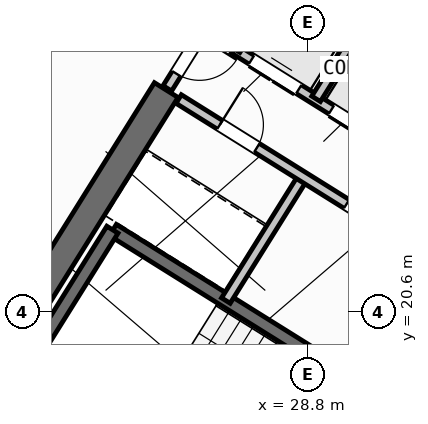
"""IFC4 building model, lengths in metres.
Left out: names, types, materials, properties, quantities, classifications, styles, units other than length and angle.
Written with IfcOpenShell. Run it as: python <this file> out.ifc"""

import sys

from ifc_helpers import new_model, si_unit, direction, frame, frame_2d, origin, place, context, subcontext, project, spatial, rectangle, extrude, source, transform, mapped, element, fill, save


model = new_model("IFC4")
c1 = context("Model", 3, precision=1e-05, world=origin(), true_north=direction((0.0, 1.0)))
c2 = subcontext(c1, "Body", "Model", "MODEL_VIEW")
j1 = project(units=[si_unit("LENGTHUNIT", "METRE"), si_unit("PLANEANGLEUNIT", "RADIAN")], contexts=[c1])
p1 = place(None, origin())
s1 = spatial("IfcSite", under=j1, at=p1, CompositionType="ELEMENT")
p2 = place(p1, origin())
s2 = spatial("IfcBuilding", under=s1, at=p2, CompositionType="ELEMENT")
p3 = place(p2, frame((0.0, 0.0, 136.2)))
s3 = spatial("IfcBuildingStorey", under=s2, at=p3, CompositionType="ELEMENT", Elevation=136.2)
p4 = place(p3, frame((40.573, 24.01, 0.0), z_axis=(0.0, 0.0, 1.0), x_axis=(-0.848047359947, 0.529920442413, 0.0)))
e1 = element("IfcWall", 1, at=p4, inside=s3, PredefinedType="SHEAR", context=c2, shape_type="SweptSolid", body=[
    extrude(rectangle(XDim=13.14, YDim=0.55, at=frame_2d((6.57, 0.0))), origin(), (0.0, 0.0, 1.0), 4.25),
])
p5 = place(p3, frame((26.007, 24.976, 0.0), z_axis=(0.0, 0.0, 1.0), x_axis=(-0.529923795287, -0.848045264823, 0.0)))
e2 = element("IfcWall", 2, at=p5, inside=s3, PredefinedType="SHEAR", context=c2, shape_type="SweptSolid", body=[
    extrude(rectangle(XDim=6.425, YDim=0.55, at=frame_2d((3.212, 0.0))), origin(), (0.0, 0.0, 1.0), 4.25),
])
p6 = place(p3, frame((29.268, 6.429, 0.0), z_axis=(0.0, 0.0, 1.0), x_axis=(-0.848049971435, 0.529916263149, 0.0)))
e3 = element("IfcWall", 3, at=p6, inside=s3, PredefinedType="STANDARD", context=c2, shape_type="SweptSolid", body=[
    extrude(rectangle(XDim=31.588, YDim=0.32, at=frame_2d((15.794, 0.0))), origin(), (0.0, 0.0, 1.0), 4.25),
])
p7 = place(p6, frame((16.374, 0.0, 0.0)))
e4 = element("IfcOpeningElement", 4, at=p7, cuts=e3, PredefinedType="OPENING", context=c2, shape_type="SweptSolid", body=[
    extrude(rectangle(XDim=1.2, YDim=2.15, at=frame_2d((0.6, 1.075))), frame((0.0, 0.17, 0.0), z_axis=(0.0, -1.0, 0.0), x_axis=(1.0, 0.0, 0.0)), (0.0, 0.0, 1.0), 0.34),
])
p8 = place(p6, frame((20.561, 0.0, 0.7)))
e5 = element("IfcOpeningElement", 5, at=p8, cuts=e3, PredefinedType="OPENING", context=c2, shape_type="SweptSolid", body=[
    extrude(rectangle(XDim=2.6, YDim=2.0, at=frame_2d((1.3, 1.0))), frame((0.0, 0.17, 0.0), z_axis=(0.0, -1.0, 0.0), x_axis=(1.0, 0.0, 0.0)), (0.0, 0.0, 1.0), 0.34),
])
p9 = place(p6, frame((27.516, 0.0, 0.75)))
e6 = element("IfcOpeningElement", 6, at=p9, cuts=e3, PredefinedType="OPENING", context=c2, shape_type="SweptSolid", body=[
    extrude(rectangle(XDim=2.0, YDim=1.95, at=frame_2d((1.0, 0.975))), frame((0.0, 0.17, 0.0), z_axis=(0.0, -1.0, 0.0), x_axis=(1.0, 0.0, 0.0)), (0.0, 0.0, 1.0), 0.34),
])
p10 = place(p3, frame((14.138, 41.825, 0.0), z_axis=(0.0, 0.0, 1.0), x_axis=(0.848046498049, -0.529921821731, 0.0)))
e7 = element("IfcWall", 7, at=p10, inside=s3, PredefinedType="STANDARD", context=c2, shape_type="SweptSolid", body=[
    extrude(rectangle(XDim=31.588, YDim=0.32, at=frame_2d((15.794, 0.0))), origin(), (0.0, 0.0, 1.0), 4.25),
])
p11 = place(p10, frame((9.857, 0.0, 0.0)))
e8 = element("IfcOpeningElement", 8, at=p11, cuts=e7, PredefinedType="OPENING", context=c2, shape_type="SweptSolid", body=[
    extrude(rectangle(XDim=1.05, YDim=2.15, at=frame_2d((0.525, 1.075))), frame((0.0, 0.17, 0.0), z_axis=(0.0, -1.0, 0.0), x_axis=(1.0, 0.0, 0.0)), (0.0, 0.0, 1.0), 0.34),
])
p12 = place(p10, frame((0.862, 0.0, 0.85)))
e9 = element("IfcOpeningElement", 9, at=p12, cuts=e7, PredefinedType="OPENING", context=c2, shape_type="SweptSolid", body=[
    extrude(rectangle(XDim=1.6, YDim=1.8, at=frame_2d((0.8, 0.9))), frame((0.0, 0.17, 0.0), z_axis=(0.0, -1.0, 0.0), x_axis=(1.0, 0.0, 0.0)), (0.0, 0.0, 1.0), 0.34),
])
p13 = place(p10, frame((7.648, 0.0, 0.85)))
e10 = element("IfcOpeningElement", 10, at=p13, cuts=e7, PredefinedType="OPENING", context=c2, shape_type="SweptSolid", body=[
    extrude(rectangle(XDim=1.6, YDim=1.8, at=frame_2d((0.8, 0.9))), frame((0.0, 0.17, 0.0), z_axis=(0.0, -1.0, 0.0), x_axis=(1.0, 0.0, 0.0)), (0.0, 0.0, 1.0), 0.34),
])
p14 = place(p10, frame((13.824, 0.0, 0.85)))
e11 = element("IfcOpeningElement", 11, at=p14, cuts=e7, PredefinedType="OPENING", context=c2, shape_type="SweptSolid", body=[
    extrude(rectangle(XDim=1.6, YDim=1.8, at=frame_2d((0.8, 0.9))), frame((0.0, 0.17, 0.0), z_axis=(0.0, -1.0, 0.0), x_axis=(1.0, 0.0, 0.0)), (0.0, 0.0, 1.0), 0.34),
])
p15 = place(p10, frame((21.294, 0.0, 0.7)))
e12 = element("IfcOpeningElement", 12, at=p15, cuts=e7, PredefinedType="OPENING", context=c2, shape_type="SweptSolid", body=[
    extrude(rectangle(XDim=2.6, YDim=2.0, at=frame_2d((1.3, 1.0))), frame((0.0, 0.17, 0.0), z_axis=(0.0, -1.0, 0.0), x_axis=(1.0, 0.0, 0.0)), (0.0, 0.0, 1.0), 0.34),
])
p16 = place(p10, frame((26.894, 0.0, 0.7)))
e13 = element("IfcOpeningElement", 13, at=p16, cuts=e7, PredefinedType="OPENING", context=c2, shape_type="SweptSolid", body=[
    extrude(rectangle(XDim=2.6, YDim=2.0, at=frame_2d((1.3, 1.0))), frame((0.0, 0.17, 0.0), z_axis=(0.0, -1.0, 0.0), x_axis=(1.0, 0.0, 0.0)), (0.0, 0.0, 1.0), 0.34),
])
p17 = place(p3, frame((31.28, 18.261, 0.0), z_axis=(0.0, 0.0, 1.0), x_axis=(-0.848051618787, 0.529913626805, 0.0)))
e14 = element("IfcWall", 14, at=p17, inside=s3, PredefinedType="SHEAR", context=c2, shape_type="SweptSolid", body=[
    extrude(rectangle(XDim=7.46, YDim=0.26, at=frame_2d((3.73, 0.0))), origin(), (0.0, 0.0, 1.0), 4.25),
])
p18 = place(p17, frame((0.36, 0.0, 0.0)))
e15 = element("IfcOpeningElement", 15, at=p18, cuts=e14, PredefinedType="OPENING", context=c2, shape_type="SweptSolid", body=[
    extrude(rectangle(XDim=0.86, YDim=2.05, at=frame_2d((0.43, 1.025))), frame((0.0, 0.14, 0.0), z_axis=(0.0, -1.0, 0.0), x_axis=(1.0, 0.0, 0.0)), (0.0, 0.0, 1.0), 0.28),
])
p19 = place(p3, frame((24.945, 22.22, 0.0), z_axis=(0.0, 0.0, 1.0), x_axis=(-0.529908658664, -0.84805472316, 0.0)))
e16 = element("IfcWall", 16, at=p19, inside=s3, PredefinedType="SHEAR", context=c2, shape_type="SweptSolid", body=[
    extrude(rectangle(XDim=3.16, YDim=0.26, at=frame_2d((1.58, 0.0))), origin(), (0.0, 0.0, 1.0), 4.25),
])
p20 = place(p3, frame((31.822, 24.998, 0.0), z_axis=(0.0, 0.0, 1.0), x_axis=(-0.848036912365, 0.52993716162, 0.0)))
e17 = element("IfcWall", 17, at=p20, inside=s3, PredefinedType="STANDARD", context=c2, shape_type="SweptSolid", body=[
    extrude(rectangle(XDim=4.618, YDim=0.2, at=frame_2d((2.309, 0.0))), origin(), (0.0, 0.0, 1.0), 4.24),
])
p21 = place(p3, frame((32.108, 22.814, 0.0), z_axis=(0.0, 0.0, 1.0), x_axis=(-0.848042229521, 0.529928652696, 0.0)))
e18 = element("IfcWall", 18, at=p21, inside=s3, PredefinedType="STANDARD", context=c2, shape_type="SweptSolid", body=[
    extrude(rectangle(XDim=5.62, YDim=0.2, at=frame_2d((2.81, 0.0))), origin(), (0.0, 0.0, 1.0), 4.24),
])
p22 = place(p21, frame((0.39, 0.0, 0.0)))
e19 = element("IfcOpeningElement", 19, at=p22, cuts=e18, PredefinedType="OPENING", context=c2, shape_type="SweptSolid", body=[
    extrude(rectangle(XDim=1.1, YDim=2.15, at=frame_2d((0.55, 1.075))), frame((0.0, 0.11, 0.0), z_axis=(0.0, -1.0, 0.0), x_axis=(1.0, 0.0, 0.0)), (0.0, 0.0, 1.0), 0.22),
])
p23 = place(p21, frame((2.25, 0.0, 0.0)))
e20 = element("IfcOpeningElement", 20, at=p23, cuts=e18, PredefinedType="OPENING", context=c2, shape_type="SweptSolid", body=[
    extrude(rectangle(XDim=1.1, YDim=2.15, at=frame_2d((0.55, 1.075))), frame((0.0, 0.11, 0.0), z_axis=(0.0, -1.0, 0.0), x_axis=(1.0, 0.0, 0.0)), (0.0, 0.0, 1.0), 0.22),
])
p24 = place(p21, frame((4.11, 0.0, 0.0)))
e21 = element("IfcOpeningElement", 21, at=p24, cuts=e18, PredefinedType="OPENING", context=c2, shape_type="SweptSolid", body=[
    extrude(rectangle(XDim=1.1, YDim=2.15, at=frame_2d((0.55, 1.075))), frame((0.0, 0.11, 0.0), z_axis=(0.0, -1.0, 0.0), x_axis=(1.0, 0.0, 0.0)), (0.0, 0.0, 1.0), 0.22),
])
p25 = place(p3, frame((28.25, 27.17, 0.0), z_axis=(0.0, 0.0, 1.0), x_axis=(-0.529905827651, -0.848056492117, 0.0)))
e22 = element("IfcWall", 22, at=p25, inside=s3, PredefinedType="STANDARD", context=c2, shape_type="SweptSolid", body=[
    extrude(rectangle(XDim=1.65, YDim=0.2, at=frame_2d((0.825, 0.0))), origin(), (0.0, 0.0, 1.0), 4.24),
])
p26 = place(p3, frame((29.801, 26.142, 0.0), z_axis=(0.0, 0.0, 1.0), x_axis=(-0.529998940003, -0.847998304005, 0.0)))
e23 = element("IfcWall", 23, at=p26, inside=s3, PredefinedType="STANDARD", context=c2, shape_type="SweptSolid", body=[
    extrude(rectangle(XDim=1.58, YDim=0.2, at=frame_2d((0.79, 0.0))), origin(), (0.0, 0.0, 1.0), 4.24),
])
p27 = place(p3, frame((28.71, 23.263, 0.0), z_axis=(0.0, 0.0, 1.0), x_axis=(-0.529907497854, -0.848055448493, 0.0)))
e24 = element("IfcWall", 24, at=p27, inside=s3, PredefinedType="STANDARD", context=c2, shape_type="SweptSolid", body=[
    extrude(rectangle(XDim=2.88, YDim=0.2, at=frame_2d((1.44, 0.0))), origin(), (0.0, 0.0, 1.0), 4.24),
])
p28 = place(p3, frame((31.525, 21.504, 0.0), z_axis=(0.0, 0.0, 1.0), x_axis=(-0.848040211232, 0.529931882541, 0.0)))
e25 = element("IfcWall", 25, at=p28, inside=s3, PredefinedType="STANDARD", context=c2, shape_type="SweptSolid", body=[
    extrude(rectangle(XDim=6.218, YDim=0.2, at=frame_2d((3.109, 0.0))), origin(), (0.0, 0.0, 1.0), 4.24),
])
p29 = place(p28, frame((4.4, 0.0, 0.0)))
e26 = element("IfcOpeningElement", 26, at=p29, cuts=e25, PredefinedType="OPENING", context=c2, shape_type="SweptSolid", body=[
    extrude(rectangle(XDim=0.86, YDim=2.05, at=frame_2d((0.43, 1.025))), frame((0.0, 0.11, 0.0), z_axis=(0.0, -1.0, 0.0), x_axis=(1.0, 0.0, 0.0)), (0.0, 0.0, 1.0), 0.22),
])
p30 = place(p28, frame((1.45, 0.0, 0.0)))
e27 = element("IfcOpeningElement", 27, at=p30, cuts=e25, PredefinedType="OPENING", context=c2, shape_type="SweptSolid", body=[
    extrude(rectangle(XDim=0.86, YDim=2.05, at=frame_2d((0.43, 1.025))), frame((0.0, 0.11, 0.0), z_axis=(0.0, -1.0, 0.0), x_axis=(1.0, 0.0, 0.0)), (0.0, 0.0, 1.0), 0.22),
])
p31 = place(p3, frame((27.596, 27.52, 0.0), z_axis=(0.0, 0.0, 1.0), x_axis=(-0.529865479138, -0.848081702443, 0.0)))
e28 = element("IfcWall", 28, at=p31, inside=s3, PredefinedType="STANDARD", context=c2, shape_type="SweptSolid", body=[
    extrude(rectangle(XDim=2.96, YDim=0.2, at=frame_2d((1.48, 0.0))), origin(), (0.0, 0.0, 1.0), 4.24),
])
p32 = place(p31, frame((1.76, 0.0, 0.0)))
e29 = element("IfcOpeningElement", 29, at=p32, cuts=e28, PredefinedType="OPENING", context=c2, shape_type="SweptSolid", body=[
    extrude(rectangle(XDim=0.86, YDim=2.05, at=frame_2d((0.43, 1.025))), frame((0.0, 0.11, 0.0), z_axis=(0.0, -1.0, 0.0), x_axis=(1.0, 0.0, 0.0)), (0.0, 0.0, 1.0), 0.22),
])
p33 = place(p3, frame((25.807, 29.582, 0.0), z_axis=(0.0, 0.0, 1.0), x_axis=(-0.529918119251, -0.84804881162, 0.0)))
e30 = element("IfcWall", 30, at=p33, inside=s3, PredefinedType="PARTITIONING", context=c2, shape_type="SweptSolid", body=[
    extrude(rectangle(XDim=17.65, YDim=0.16, at=frame_2d((8.825, 0.0))), origin(), (0.0, 0.0, 1.0), 4.24),
])
m1 = source(origin(), c2, "Body", "SweptSolid", [
    extrude(rectangle(XDim=1.1, YDim=2.15, at=frame_2d((0.55, 1.075))), frame((0.0, 0.025, 0.0), z_axis=(0.0, -1.0, 0.0), x_axis=(1.0, 0.0, 0.0)), (0.0, 0.0, 1.0), 0.05),
])
p34 = place(p23, origin())
e31 = element("IfcDoor", 31, at=p34, inside=s3, OperationType="DOUBLE_DOOR_SLIDING", PredefinedType="DOOR", context=c2, shape_type="MappedRepresentation", body=[
    mapped(m1, transform((0.0, 0.0, 0.0), scale=1.0)),
])
fill(e20, e31)
p35 = place(p24, origin())
e32 = element("IfcDoor", 32, at=p35, inside=s3, OperationType="DOUBLE_DOOR_SLIDING", PredefinedType="DOOR", context=c2, shape_type="MappedRepresentation", body=[
    mapped(m1, transform((0.0, 0.0, 0.0), scale=1.0)),
])
fill(e21, e32)
m2 = source(origin(), c2, "Body", "SweptSolid", [
    extrude(rectangle(XDim=0.86, YDim=2.05, at=frame_2d((0.43, 1.025))), frame((0.0, 0.025, 0.0), z_axis=(0.0, -1.0, 0.0), x_axis=(1.0, 0.0, 0.0)), (0.0, 0.0, 1.0), 0.05),
])
p36 = place(p29, frame((0.86, 0.0, 0.0), z_axis=(0.0, 0.0, 1.0), x_axis=(-1.0, 0.0, 0.0)))
e33 = element("IfcDoor", 33, at=p36, inside=s3, OperationType="SINGLE_SWING_LEFT", PredefinedType="DOOR", context=c2, shape_type="MappedRepresentation", body=[
    mapped(m2, transform((0.0, 0.0, 0.0), scale=1.0)),
])
fill(e26, e33)
p37 = place(p30, frame((0.86, 0.0, 0.0), z_axis=(0.0, 0.0, 1.0), x_axis=(-1.0, 0.0, 0.0)))
e34 = element("IfcDoor", 34, at=p37, inside=s3, OperationType="SINGLE_SWING_RIGHT", PredefinedType="DOOR", context=c2, shape_type="MappedRepresentation", body=[
    mapped(m2, transform((0.0, 0.0, 0.0), scale=1.0)),
])
fill(e27, e34)
p38 = place(p32, origin())
e35 = element("IfcDoor", 35, at=p38, inside=s3, OperationType="SINGLE_SWING_LEFT", PredefinedType="DOOR", context=c2, shape_type="MappedRepresentation", body=[
    mapped(m2, transform((0.0, 0.0, 0.0), scale=1.0)),
])
fill(e29, e35)
save(model, sys.argv[1])
